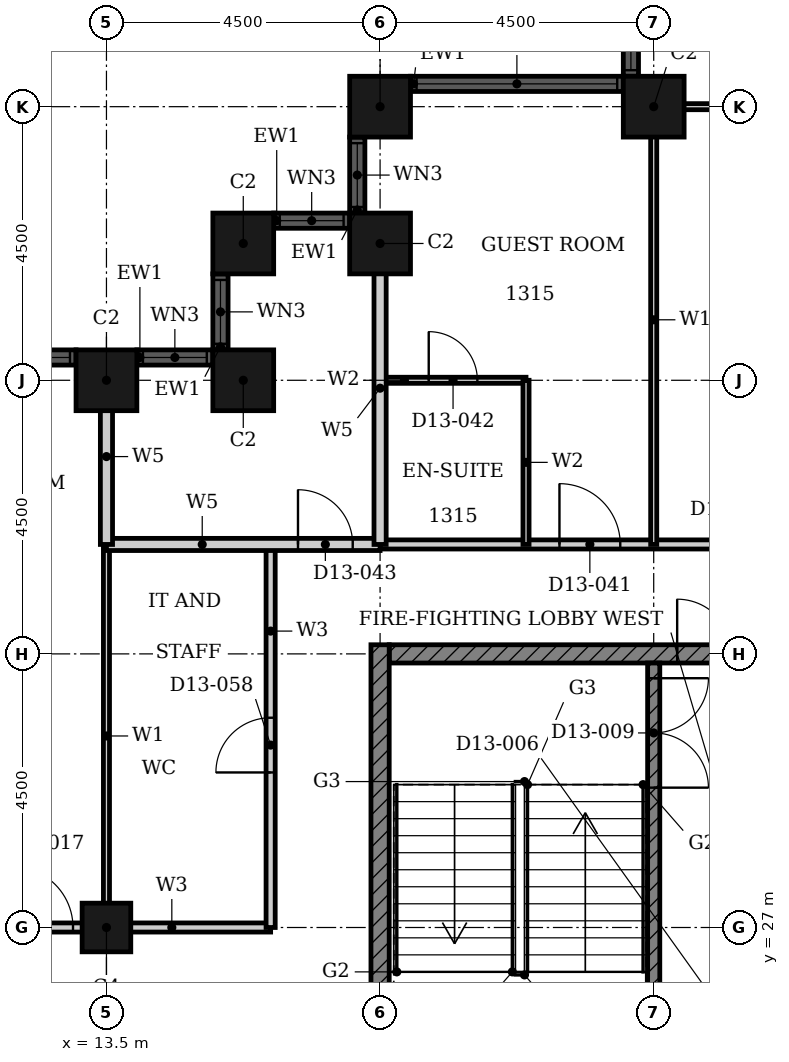
"""IFC4 building model, lengths in metres.
Left out: names, types, materials, properties, quantities, classifications, styles, units other than length and angle.
Written with IfcOpenShell. Run it as: python <this file> out.ifc"""

import sys

from ifc_helpers import new_model, si_unit, direction, frame, frame_2d, origin, origin_2d, place, context, subcontext, project, spatial, rectangle, hollow_rectangle, extrude, element, fill, save


model = new_model("IFC4")
c1 = context("Model", 3, precision=1e-05, world=origin(), true_north=direction((0.0, 1.0)))
c2 = subcontext(c1, "Body", "Model", "MODEL_VIEW")
j1 = project(units=[si_unit("LENGTHUNIT", "METRE"), si_unit("PLANEANGLEUNIT", "RADIAN")], contexts=[c1])
p1 = place(None, origin())
s1 = spatial("IfcSite", under=j1, at=p1, CompositionType="ELEMENT")
p2 = place(p1, origin())
s2 = spatial("IfcBuilding", under=s1, at=p2, CompositionType="ELEMENT")
p3 = place(p2, frame((0.0, 0.0, 60.0)))
s3 = spatial("IfcBuildingStorey", under=s2, at=p3, CompositionType="ELEMENT", Elevation=60.0)
for number, where, z_axis, x_axis in (
    (1, (22.5, 40.5, 0.0), (0.0, 0.0, 1.0), (1.0, 0.0, 0.0)),
    (2, (18.0, 40.5, 0.0), (0.0, 0.0, 1.0), (1.0, 0.0, 0.0)),
    (3, (18.0, 38.25, 0.0), (0.0, 0.0, 1.0), (1.0, 0.0, 0.0)),
    (4, (15.75, 38.25, 0.0), (0.0, 0.0, 1.0), (1.0, 0.0, 0.0)),
    (5, (15.75, 36.0, 0.0), (0.0, 0.0, 1.0), (1.0, 0.0, 0.0)),
    (6, (13.5, 36.0, 0.0), (0.0, 0.0, 1.0), (1.0, 0.0, 0.0)),
):
    element("IfcColumn", number, at=place(p3, frame(where, z_axis=z_axis, x_axis=x_axis)), inside=s3, PredefinedType="COLUMN", context=c2, shape_type="SweptSolid", body=[
        extrude(hollow_rectangle(XDim=1.0, YDim=1.0, WallThickness=0.032, at=origin_2d()), origin(), (0.0, 0.0, 1.0), 3.6),
    ])
p4 = place(p3, frame((13.5, 27.0, 0.0), z_axis=(0.0, 0.0, 1.0), x_axis=(1.0, 0.0, 0.0)))
e7 = element("IfcColumn", 7, at=p4, inside=s3, PredefinedType="COLUMN", context=c2, shape_type="SweptSolid", body=[
    extrude(hollow_rectangle(XDim=0.8, YDim=0.8, WallThickness=0.025, at=origin_2d()), origin(), (0.0, 0.0, 1.0), 3.6),
])
p5 = place(p3, frame((22.125, 49.0, 0.0), z_axis=(0.0, 0.0, 1.0), x_axis=(0.0, -1.0, 0.0)))
e8 = element("IfcWall", 8, at=p5, inside=s3, PredefinedType="SOLIDWALL", context=c2, shape_type="SweptSolid", body=[
    extrude(rectangle(XDim=8.0, YDim=0.25, at=frame_2d((4.0, 0.0))), origin(), (0.0, 0.0, 1.0), 3.6),
])
p6 = place(p5, frame((0.1, 0.0, 0.9)))
e9 = element("IfcOpeningElement", 9, at=p6, cuts=e8, PredefinedType="OPENING", context=c2, shape_type="SweptSolid", body=[
    extrude(rectangle(XDim=3.3, YDim=2.08, at=frame_2d((1.65, 1.04))), frame((0.0, 0.135, 0.0), z_axis=(0.0, -1.0, 0.0), x_axis=(1.0, 0.0, 0.0)), (0.0, 0.0, 1.0), 0.27),
])
p7 = place(p5, frame((4.6, 0.0, 0.9)))
e10 = element("IfcOpeningElement", 10, at=p7, cuts=e8, PredefinedType="OPENING", context=c2, shape_type="SweptSolid", body=[
    extrude(rectangle(XDim=3.3, YDim=2.08, at=frame_2d((1.65, 1.04))), frame((0.0, 0.135, 0.0), z_axis=(0.0, -1.0, 0.0), x_axis=(1.0, 0.0, 0.0)), (0.0, 0.0, 1.0), 0.27),
])
p8 = place(p3, frame((22.0, 40.875, 0.0), z_axis=(0.0, 0.0, 1.0), x_axis=(-1.0, 0.0, 0.0)))
e11 = element("IfcWall", 11, at=p8, inside=s3, PredefinedType="SOLIDWALL", context=c2, shape_type="SweptSolid", body=[
    extrude(rectangle(XDim=3.5, YDim=0.25, at=frame_2d((1.75, 0.0))), origin(), (0.0, 0.0, 1.0), 3.6),
])
p9 = place(p8, frame((0.1, 0.0, 0.9)))
e12 = element("IfcOpeningElement", 12, at=p9, cuts=e11, PredefinedType="OPENING", context=c2, shape_type="SweptSolid", body=[
    extrude(rectangle(XDim=3.3, YDim=2.08, at=frame_2d((1.65, 1.04))), frame((0.0, 0.135, 0.0), z_axis=(0.0, -1.0, 0.0), x_axis=(1.0, 0.0, 0.0)), (0.0, 0.0, 1.0), 0.27),
])
p10 = place(p3, frame((17.625, 40.0, 0.0), z_axis=(0.0, 0.0, 1.0), x_axis=(0.0, -1.0, 0.0)))
e13 = element("IfcWall", 13, at=p10, inside=s3, PredefinedType="SOLIDWALL", context=c2, shape_type="SweptSolid", body=[
    extrude(rectangle(XDim=1.25, YDim=0.25, at=frame_2d((0.625, 0.0))), origin(), (0.0, 0.0, 1.0), 3.6),
])
p11 = place(p10, frame((0.1, 0.0, 0.9)))
e14 = element("IfcOpeningElement", 14, at=p11, cuts=e13, PredefinedType="OPENING", context=c2, shape_type="SweptSolid", body=[
    extrude(rectangle(XDim=1.05, YDim=2.08, at=frame_2d((0.525, 1.04))), frame((0.0, 0.135, 0.0), z_axis=(0.0, -1.0, 0.0), x_axis=(1.0, 0.0, 0.0)), (0.0, 0.0, 1.0), 0.27),
])
p12 = place(p3, frame((17.5, 38.625, 0.0), z_axis=(0.0, 0.0, 1.0), x_axis=(-1.0, 0.0, 0.0)))
e15 = element("IfcWall", 15, at=p12, inside=s3, PredefinedType="SOLIDWALL", context=c2, shape_type="SweptSolid", body=[
    extrude(rectangle(XDim=1.25, YDim=0.25, at=frame_2d((0.625, 0.0))), origin(), (0.0, 0.0, 1.0), 3.6),
])
p13 = place(p12, frame((0.1, 0.0, 0.9)))
e16 = element("IfcOpeningElement", 16, at=p13, cuts=e15, PredefinedType="OPENING", context=c2, shape_type="SweptSolid", body=[
    extrude(rectangle(XDim=1.05, YDim=2.08, at=frame_2d((0.525, 1.04))), frame((0.0, 0.135, 0.0), z_axis=(0.0, -1.0, 0.0), x_axis=(1.0, 0.0, 0.0)), (0.0, 0.0, 1.0), 0.27),
])
p14 = place(p3, frame((15.375, 37.75, 0.0), z_axis=(0.0, 0.0, 1.0), x_axis=(0.0, -1.0, 0.0)))
e17 = element("IfcWall", 17, at=p14, inside=s3, PredefinedType="SOLIDWALL", context=c2, shape_type="SweptSolid", body=[
    extrude(rectangle(XDim=1.25, YDim=0.25, at=frame_2d((0.625, 0.0))), origin(), (0.0, 0.0, 1.0), 3.6),
])
p15 = place(p14, frame((0.1, 0.0, 0.9)))
e18 = element("IfcOpeningElement", 18, at=p15, cuts=e17, PredefinedType="OPENING", context=c2, shape_type="SweptSolid", body=[
    extrude(rectangle(XDim=1.05, YDim=2.08, at=frame_2d((0.525, 1.04))), frame((0.0, 0.135, 0.0), z_axis=(0.0, -1.0, 0.0), x_axis=(1.0, 0.0, 0.0)), (0.0, 0.0, 1.0), 0.27),
])
p16 = place(p3, frame((15.25, 36.375, 0.0), z_axis=(0.0, 0.0, 1.0), x_axis=(-1.0, 0.0, 0.0)))
e19 = element("IfcWall", 19, at=p16, inside=s3, PredefinedType="SOLIDWALL", context=c2, shape_type="SweptSolid", body=[
    extrude(rectangle(XDim=1.25, YDim=0.25, at=frame_2d((0.625, 0.0))), origin(), (0.0, 0.0, 1.0), 3.6),
])
p17 = place(p16, frame((0.1, 0.0, 0.9)))
e20 = element("IfcOpeningElement", 20, at=p17, cuts=e19, PredefinedType="OPENING", context=c2, shape_type="SweptSolid", body=[
    extrude(rectangle(XDim=1.05, YDim=2.08, at=frame_2d((0.525, 1.04))), frame((0.0, 0.135, 0.0), z_axis=(0.0, -1.0, 0.0), x_axis=(1.0, 0.0, 0.0)), (0.0, 0.0, 1.0), 0.27),
])
p18 = place(p3, frame((13.0, 36.375, 0.0), z_axis=(0.0, 0.0, 1.0), x_axis=(-1.0, 0.0, 0.0)))
e21 = element("IfcWall", 21, at=p18, inside=s3, PredefinedType="SOLIDWALL", context=c2, shape_type="SweptSolid", body=[
    extrude(rectangle(XDim=8.0, YDim=0.25, at=frame_2d((4.0, 0.0))), origin(), (0.0, 0.0, 1.0), 3.6),
])
p19 = place(p18, frame((0.1, 0.0, 0.9)))
e22 = element("IfcOpeningElement", 22, at=p19, cuts=e21, PredefinedType="OPENING", context=c2, shape_type="SweptSolid", body=[
    extrude(rectangle(XDim=3.3, YDim=2.08, at=frame_2d((1.65, 1.04))), frame((0.0, 0.135, 0.0), z_axis=(0.0, -1.0, 0.0), x_axis=(1.0, 0.0, 0.0)), (0.0, 0.0, 1.0), 0.27),
])
p20 = place(p18, frame((4.6, 0.0, 0.9)))
e23 = element("IfcOpeningElement", 23, at=p20, cuts=e21, PredefinedType="OPENING", context=c2, shape_type="SweptSolid", body=[
    extrude(rectangle(XDim=3.3, YDim=2.08, at=frame_2d((1.65, 1.04))), frame((0.0, 0.135, 0.0), z_axis=(0.0, -1.0, 0.0), x_axis=(1.0, 0.0, 0.0)), (0.0, 0.0, 1.0), 0.27),
])
p21 = place(p3, frame((18.15, 31.5, 0.0), z_axis=(0.0, 0.0, 1.0), x_axis=(1.0, 0.0, 0.0)))
e24 = element("IfcWall", 24, at=p21, inside=s3, PredefinedType="SHEAR", context=c2, shape_type="SweptSolid", body=[
    extrude(rectangle(XDim=6.797, YDim=0.3, at=frame_2d((3.398, 0.0))), origin(), (0.0, 0.0, 1.0), 3.3),
])
p22 = place(p21, frame((4.736, 0.0, 0.0)))
e25 = element("IfcOpeningElement", 25, at=p22, cuts=e24, PredefinedType="OPENING", context=c2, shape_type="SweptSolid", body=[
    extrude(rectangle(XDim=1.8, YDim=2.1, at=frame_2d((0.9, 1.05))), frame((0.0, 0.16, 0.0), z_axis=(0.0, -1.0, 0.0), x_axis=(1.0, 0.0, 0.0)), (0.0, 0.0, 1.0), 0.32),
])
p23 = place(p3, frame((18.0, 22.35, 0.0), z_axis=(0.0, 0.0, 1.0), x_axis=(0.0, 1.0, 0.0)))
e26 = element("IfcWall", 26, at=p23, inside=s3, PredefinedType="SHEAR", context=c2, shape_type="SweptSolid", body=[
    extrude(rectangle(XDim=9.3, YDim=0.3, at=frame_2d((4.65, 0.0))), origin(), (0.0, 0.0, 1.0), 3.3),
])
p24 = place(p3, frame((22.5, 31.35, 0.0), z_axis=(0.0, 0.0, 1.0), x_axis=(0.0, -1.0, 0.0)))
e27 = element("IfcWall", 27, at=p24, inside=s3, PredefinedType="SHEAR", context=c2, shape_type="SweptSolid", body=[
    extrude(rectangle(XDim=5.825, YDim=0.2, at=frame_2d((2.913, 0.0))), origin(), (0.0, 0.0, 1.0), 3.3),
])
p25 = place(p24, frame((0.25, 0.0, 0.0)))
e28 = element("IfcOpeningElement", 28, at=p25, cuts=e27, PredefinedType="OPENING", context=c2, shape_type="SweptSolid", body=[
    extrude(rectangle(XDim=1.8, YDim=2.1, at=frame_2d((0.9, 1.05))), frame((0.0, 0.11, 0.0), z_axis=(0.0, -1.0, 0.0), x_axis=(1.0, 0.0, 0.0)), (0.0, 0.0, 1.0), 0.22),
])
p26 = place(p3, frame((9.0, 27.0, 0.0), z_axis=(0.0, 0.0, 1.0), x_axis=(1.0, 0.0, 0.0)))
e29 = element("IfcWall", 29, at=p26, inside=s3, PredefinedType="PARTITIONING", context=c2, shape_type="SweptSolid", body=[
    extrude(rectangle(XDim=7.2, YDim=0.15, at=frame_2d((3.6, 0.0))), origin(), (0.0, 0.0, 1.0), 2.58),
])
p27 = place(p26, frame((2.95, 0.0, 0.0)))
e30 = element("IfcOpeningElement", 30, at=p27, cuts=e29, PredefinedType="OPENING", context=c2, shape_type="SweptSolid", body=[
    extrude(rectangle(XDim=1.0, YDim=2.1, at=frame_2d((0.5, 1.05))), frame((0.0, 0.085, 0.0), z_axis=(0.0, -1.0, 0.0), x_axis=(1.0, 0.0, 0.0)), (0.0, 0.0, 1.0), 0.17),
])
p28 = place(p3, frame((18.0, 33.3, 0.0), z_axis=(0.0, 0.0, 1.0), x_axis=(1.0, 0.0, 0.0)))
e31 = element("IfcWall", 31, at=p28, inside=s3, PredefinedType="PARTITIONING", context=c2, shape_type="SweptSolid", body=[
    extrude(rectangle(XDim=13.5, YDim=0.15, at=frame_2d((6.75, 0.0))), origin(), (0.0, 0.0, 1.0), 3.3),
])
p29 = place(p28, frame((2.95, 0.0, 0.0)))
e32 = element("IfcOpeningElement", 32, at=p29, cuts=e31, PredefinedType="OPENING", context=c2, shape_type="SweptSolid", body=[
    extrude(rectangle(XDim=1.0, YDim=2.1, at=frame_2d((0.5, 1.05))), frame((0.0, 0.085, 0.0), z_axis=(0.0, -1.0, 0.0), x_axis=(1.0, 0.0, 0.0)), (0.0, 0.0, 1.0), 0.17),
])
p30 = place(p28, frame((8.55, 0.0, 0.0)))
e33 = element("IfcOpeningElement", 33, at=p30, cuts=e31, PredefinedType="OPENING", context=c2, shape_type="SweptSolid", body=[
    extrude(rectangle(XDim=0.9, YDim=2.1, at=frame_2d((0.45, 1.05))), frame((0.0, 0.085, 0.0), z_axis=(0.0, -1.0, 0.0), x_axis=(1.0, 0.0, 0.0)), (0.0, 0.0, 1.0), 0.17),
])
p31 = place(p3, frame((16.2, 27.0, 0.0), z_axis=(0.0, 0.0, 1.0), x_axis=(0.0, 1.0, 0.0)))
e34 = element("IfcWall", 34, at=p31, inside=s3, PredefinedType="PARTITIONING", context=c2, shape_type="SweptSolid", body=[
    extrude(rectangle(XDim=6.3, YDim=0.15, at=frame_2d((3.15, 0.0))), origin(), (0.0, 0.0, 1.0), 3.3),
])
p32 = place(p31, frame((2.55, 0.0, 0.0)))
e35 = element("IfcOpeningElement", 35, at=p32, cuts=e34, PredefinedType="OPENING", context=c2, shape_type="SweptSolid", body=[
    extrude(rectangle(XDim=0.9, YDim=2.1, at=frame_2d((0.45, 1.05))), frame((0.0, 0.085, 0.0), z_axis=(0.0, -1.0, 0.0), x_axis=(1.0, 0.0, 0.0)), (0.0, 0.0, 1.0), 0.17),
])
p33 = place(p3, frame((22.31, 40.5, 0.0), z_axis=(0.0, 0.0, 1.0), x_axis=(1.0, 0.0, 0.0)))
e36 = element("IfcWall", 36, at=p33, inside=s3, PredefinedType="PARTITIONING", context=c2, shape_type="SweptSolid", body=[
    extrude(rectangle(XDim=9.19, YDim=0.1, at=frame_2d((4.595, 0.0))), origin(), (0.0, 0.0, 1.0), 2.38),
])
p34 = place(p3, frame((13.5, 27.0, 0.0), z_axis=(0.0, 0.0, 1.0), x_axis=(0.0, 1.0, 0.0)))
e37 = element("IfcWall", 37, at=p34, inside=s3, PredefinedType="PARTITIONING", context=c2, shape_type="SweptSolid", body=[
    extrude(rectangle(XDim=6.3, YDim=0.1, at=frame_2d((3.15, 0.0))), origin(), (0.0, 0.0, 1.0), 2.38),
])
p35 = place(p3, frame((22.5, 33.3, 0.0), z_axis=(0.0, 0.0, 1.0), x_axis=(0.0, 1.0, 0.0)))
e38 = element("IfcWall", 38, at=p35, inside=s3, PredefinedType="PARTITIONING", context=c2, shape_type="SweptSolid", body=[
    extrude(rectangle(XDim=7.39, YDim=0.1, at=frame_2d((3.695, 0.0))), origin(), (0.0, 0.0, 1.0), 3.3),
])
p36 = place(p3, frame((18.0, 36.0, 0.0), z_axis=(0.0, 0.0, 1.0), x_axis=(1.0, 0.0, 0.0)))
e39 = element("IfcWall", 39, at=p36, inside=s3, PredefinedType="PARTITIONING", context=c2, shape_type="SweptSolid", body=[
    extrude(rectangle(XDim=2.4, YDim=0.1, at=frame_2d((1.2, 0.0))), origin(), (0.0, 0.0, 1.0), 3.3),
])
p37 = place(p36, frame((0.8, 0.0, 0.0)))
e40 = element("IfcOpeningElement", 40, at=p37, cuts=e39, PredefinedType="OPENING", context=c2, shape_type="SweptSolid", body=[
    extrude(rectangle(XDim=0.8, YDim=2.1, at=frame_2d((0.4, 1.05))), frame((0.0, 0.06, 0.0), z_axis=(0.0, -1.0, 0.0), x_axis=(1.0, 0.0, 0.0)), (0.0, 0.0, 1.0), 0.12),
])
p38 = place(p3, frame((20.4, 33.3, 0.0), z_axis=(0.0, 0.0, 1.0), x_axis=(0.0, 1.0, 0.0)))
e41 = element("IfcWall", 41, at=p38, inside=s3, PredefinedType="PARTITIONING", context=c2, shape_type="SweptSolid", body=[
    extrude(rectangle(XDim=2.7, YDim=0.1, at=frame_2d((1.35, 0.0))), origin(), (0.0, 0.0, 1.0), 3.3),
])
p39 = place(p3, frame((13.5, 33.3, 0.0), z_axis=(0.0, 0.0, 1.0), x_axis=(1.0, 0.0, 0.0)))
e42 = element("IfcWall", 42, at=p39, inside=s3, PredefinedType="PARTITIONING", context=c2, shape_type="SweptSolid", body=[
    extrude(rectangle(XDim=4.5, YDim=0.2, at=frame_2d((2.25, 0.0))), origin(), (0.0, 0.0, 1.0), 3.3),
])
p40 = place(p39, frame((3.15, 0.0, 0.0)))
e43 = element("IfcOpeningElement", 43, at=p40, cuts=e42, PredefinedType="OPENING", context=c2, shape_type="SweptSolid", body=[
    extrude(rectangle(XDim=0.9, YDim=2.1, at=frame_2d((0.45, 1.05))), frame((0.0, 0.11, 0.0), z_axis=(0.0, -1.0, 0.0), x_axis=(1.0, 0.0, 0.0)), (0.0, 0.0, 1.0), 0.22),
])
p41 = place(p3, frame((13.5, 33.3, 0.0), z_axis=(0.0, 0.0, 1.0), x_axis=(0.0, 1.0, 0.0)))
e44 = element("IfcWall", 44, at=p41, inside=s3, PredefinedType="PARTITIONING", context=c2, shape_type="SweptSolid", body=[
    extrude(rectangle(XDim=2.89, YDim=0.2, at=frame_2d((1.445, 0.0))), origin(), (0.0, 0.0, 1.0), 2.38),
])
p42 = place(p3, frame((18.0, 33.3, 0.0), z_axis=(0.0, 0.0, 1.0), x_axis=(0.0, 1.0, 0.0)))
e45 = element("IfcWall", 45, at=p42, inside=s3, PredefinedType="PARTITIONING", context=c2, shape_type="SweptSolid", body=[
    extrude(rectangle(XDim=5.14, YDim=0.2, at=frame_2d((2.57, 0.0))), origin(), (0.0, 0.0, 1.0), 3.3),
])
p43 = place(p7, origin())
e46 = element("IfcWindow", 46, at=p43, inside=s3, PartitioningType="SINGLE_PANEL", PredefinedType="WINDOW", context=c2, shape_type="SweptSolid", body=[
    extrude(rectangle(XDim=3.3, YDim=2.08, at=frame_2d((1.65, 1.04))), frame((0.0, 0.03, 0.0), z_axis=(0.0, -1.0, 0.0), x_axis=(1.0, 0.0, 0.0)), (0.0, 0.0, 1.0), 0.06),
])
fill(e10, e46)
p44 = place(p9, origin())
e47 = element("IfcWindow", 47, at=p44, inside=s3, PartitioningType="SINGLE_PANEL", PredefinedType="WINDOW", context=c2, shape_type="SweptSolid", body=[
    extrude(rectangle(XDim=3.3, YDim=2.08, at=frame_2d((1.65, 1.04))), frame((0.0, 0.03, 0.0), z_axis=(0.0, -1.0, 0.0), x_axis=(1.0, 0.0, 0.0)), (0.0, 0.0, 1.0), 0.06),
])
fill(e12, e47)
p45 = place(p11, origin())
e48 = element("IfcWindow", 48, at=p45, inside=s3, PartitioningType="SINGLE_PANEL", PredefinedType="WINDOW", context=c2, shape_type="SweptSolid", body=[
    extrude(rectangle(XDim=1.05, YDim=2.08, at=frame_2d((0.525, 1.04))), frame((0.0, 0.03, 0.0), z_axis=(0.0, -1.0, 0.0), x_axis=(1.0, 0.0, 0.0)), (0.0, 0.0, 1.0), 0.06),
])
fill(e14, e48)
p46 = place(p13, origin())
e49 = element("IfcWindow", 49, at=p46, inside=s3, PartitioningType="SINGLE_PANEL", PredefinedType="WINDOW", context=c2, shape_type="SweptSolid", body=[
    extrude(rectangle(XDim=1.05, YDim=2.08, at=frame_2d((0.525, 1.04))), frame((0.0, 0.03, 0.0), z_axis=(0.0, -1.0, 0.0), x_axis=(1.0, 0.0, 0.0)), (0.0, 0.0, 1.0), 0.06),
])
fill(e16, e49)
p47 = place(p15, origin())
e50 = element("IfcWindow", 50, at=p47, inside=s3, PartitioningType="SINGLE_PANEL", PredefinedType="WINDOW", context=c2, shape_type="SweptSolid", body=[
    extrude(rectangle(XDim=1.05, YDim=2.08, at=frame_2d((0.525, 1.04))), frame((0.0, 0.03, 0.0), z_axis=(0.0, -1.0, 0.0), x_axis=(1.0, 0.0, 0.0)), (0.0, 0.0, 1.0), 0.06),
])
fill(e18, e50)
p48 = place(p17, origin())
e51 = element("IfcWindow", 51, at=p48, inside=s3, PartitioningType="SINGLE_PANEL", PredefinedType="WINDOW", context=c2, shape_type="SweptSolid", body=[
    extrude(rectangle(XDim=1.05, YDim=2.08, at=frame_2d((0.525, 1.04))), frame((0.0, 0.03, 0.0), z_axis=(0.0, -1.0, 0.0), x_axis=(1.0, 0.0, 0.0)), (0.0, 0.0, 1.0), 0.06),
])
fill(e20, e51)
p49 = place(p19, origin())
e52 = element("IfcWindow", 52, at=p49, inside=s3, PartitioningType="SINGLE_PANEL", PredefinedType="WINDOW", context=c2, shape_type="SweptSolid", body=[
    extrude(rectangle(XDim=3.3, YDim=2.08, at=frame_2d((1.65, 1.04))), frame((0.0, 0.03, 0.0), z_axis=(0.0, -1.0, 0.0), x_axis=(1.0, 0.0, 0.0)), (0.0, 0.0, 1.0), 0.06),
])
fill(e22, e52)
p50 = place(p25, origin())
e53 = element("IfcDoor", 53, at=p50, inside=s3, OperationType="DOUBLE_DOOR_SINGLE_SWING", PredefinedType="DOOR", context=c2, shape_type="SweptSolid", body=[
    extrude(rectangle(XDim=1.8, YDim=2.1, at=frame_2d((0.9, 1.05))), frame((0.0, 0.025, 0.0), z_axis=(0.0, -1.0, 0.0), x_axis=(1.0, 0.0, 0.0)), (0.0, 0.0, 1.0), 0.05),
])
fill(e28, e53)
p51 = place(p22, origin())
e54 = element("IfcDoor", 54, at=p51, inside=s3, OperationType="DOUBLE_DOOR_SINGLE_SWING", PredefinedType="DOOR", context=c2, shape_type="SweptSolid", body=[
    extrude(rectangle(XDim=1.8, YDim=2.1, at=frame_2d((0.9, 1.05))), frame((0.0, 0.025, 0.0), z_axis=(0.0, -1.0, 0.0), x_axis=(1.0, 0.0, 0.0)), (0.0, 0.0, 1.0), 0.05),
])
fill(e25, e54)
p52 = place(p27, origin())
e55 = element("IfcDoor", 55, at=p52, inside=s3, OperationType="SINGLE_SWING_RIGHT", PredefinedType="DOOR", context=c2, shape_type="SweptSolid", body=[
    extrude(rectangle(XDim=1.0, YDim=2.1, at=frame_2d((0.5, 1.05))), frame((0.0, 0.025, 0.0), z_axis=(0.0, -1.0, 0.0), x_axis=(1.0, 0.0, 0.0)), (0.0, 0.0, 1.0), 0.05),
])
fill(e30, e55)
p53 = place(p29, origin())
e56 = element("IfcDoor", 56, at=p53, inside=s3, OperationType="SINGLE_SWING_RIGHT", PredefinedType="DOOR", context=c2, shape_type="SweptSolid", body=[
    extrude(rectangle(XDim=1.0, YDim=2.1, at=frame_2d((0.5, 1.05))), frame((0.0, 0.025, 0.0), z_axis=(0.0, -1.0, 0.0), x_axis=(1.0, 0.0, 0.0)), (0.0, 0.0, 1.0), 0.05),
])
fill(e32, e56)
p54 = place(p37, origin())
e57 = element("IfcDoor", 57, at=p54, inside=s3, OperationType="SINGLE_SWING_RIGHT", PredefinedType="DOOR", context=c2, shape_type="SweptSolid", body=[
    extrude(rectangle(XDim=0.8, YDim=2.1, at=frame_2d((0.4, 1.05))), frame((0.0, 0.025, 0.0), z_axis=(0.0, -1.0, 0.0), x_axis=(1.0, 0.0, 0.0)), (0.0, 0.0, 1.0), 0.05),
])
fill(e40, e57)
p55 = place(p40, origin())
e58 = element("IfcDoor", 58, at=p55, inside=s3, OperationType="SINGLE_SWING_RIGHT", PredefinedType="DOOR", context=c2, shape_type="SweptSolid", body=[
    extrude(rectangle(XDim=0.9, YDim=2.1, at=frame_2d((0.45, 1.05))), frame((0.0, 0.025, 0.0), z_axis=(0.0, -1.0, 0.0), x_axis=(1.0, 0.0, 0.0)), (0.0, 0.0, 1.0), 0.05),
])
fill(e43, e58)
p56 = place(p32, origin())
e59 = element("IfcDoor", 59, at=p56, inside=s3, OperationType="SINGLE_SWING_LEFT", PredefinedType="DOOR", context=c2, shape_type="SweptSolid", body=[
    extrude(rectangle(XDim=0.9, YDim=2.1, at=frame_2d((0.45, 1.05))), frame((0.0, 0.025, 0.0), z_axis=(0.0, -1.0, 0.0), x_axis=(1.0, 0.0, 0.0)), (0.0, 0.0, 1.0), 0.05),
])
fill(e35, e59)
save(model, sys.argv[1])
